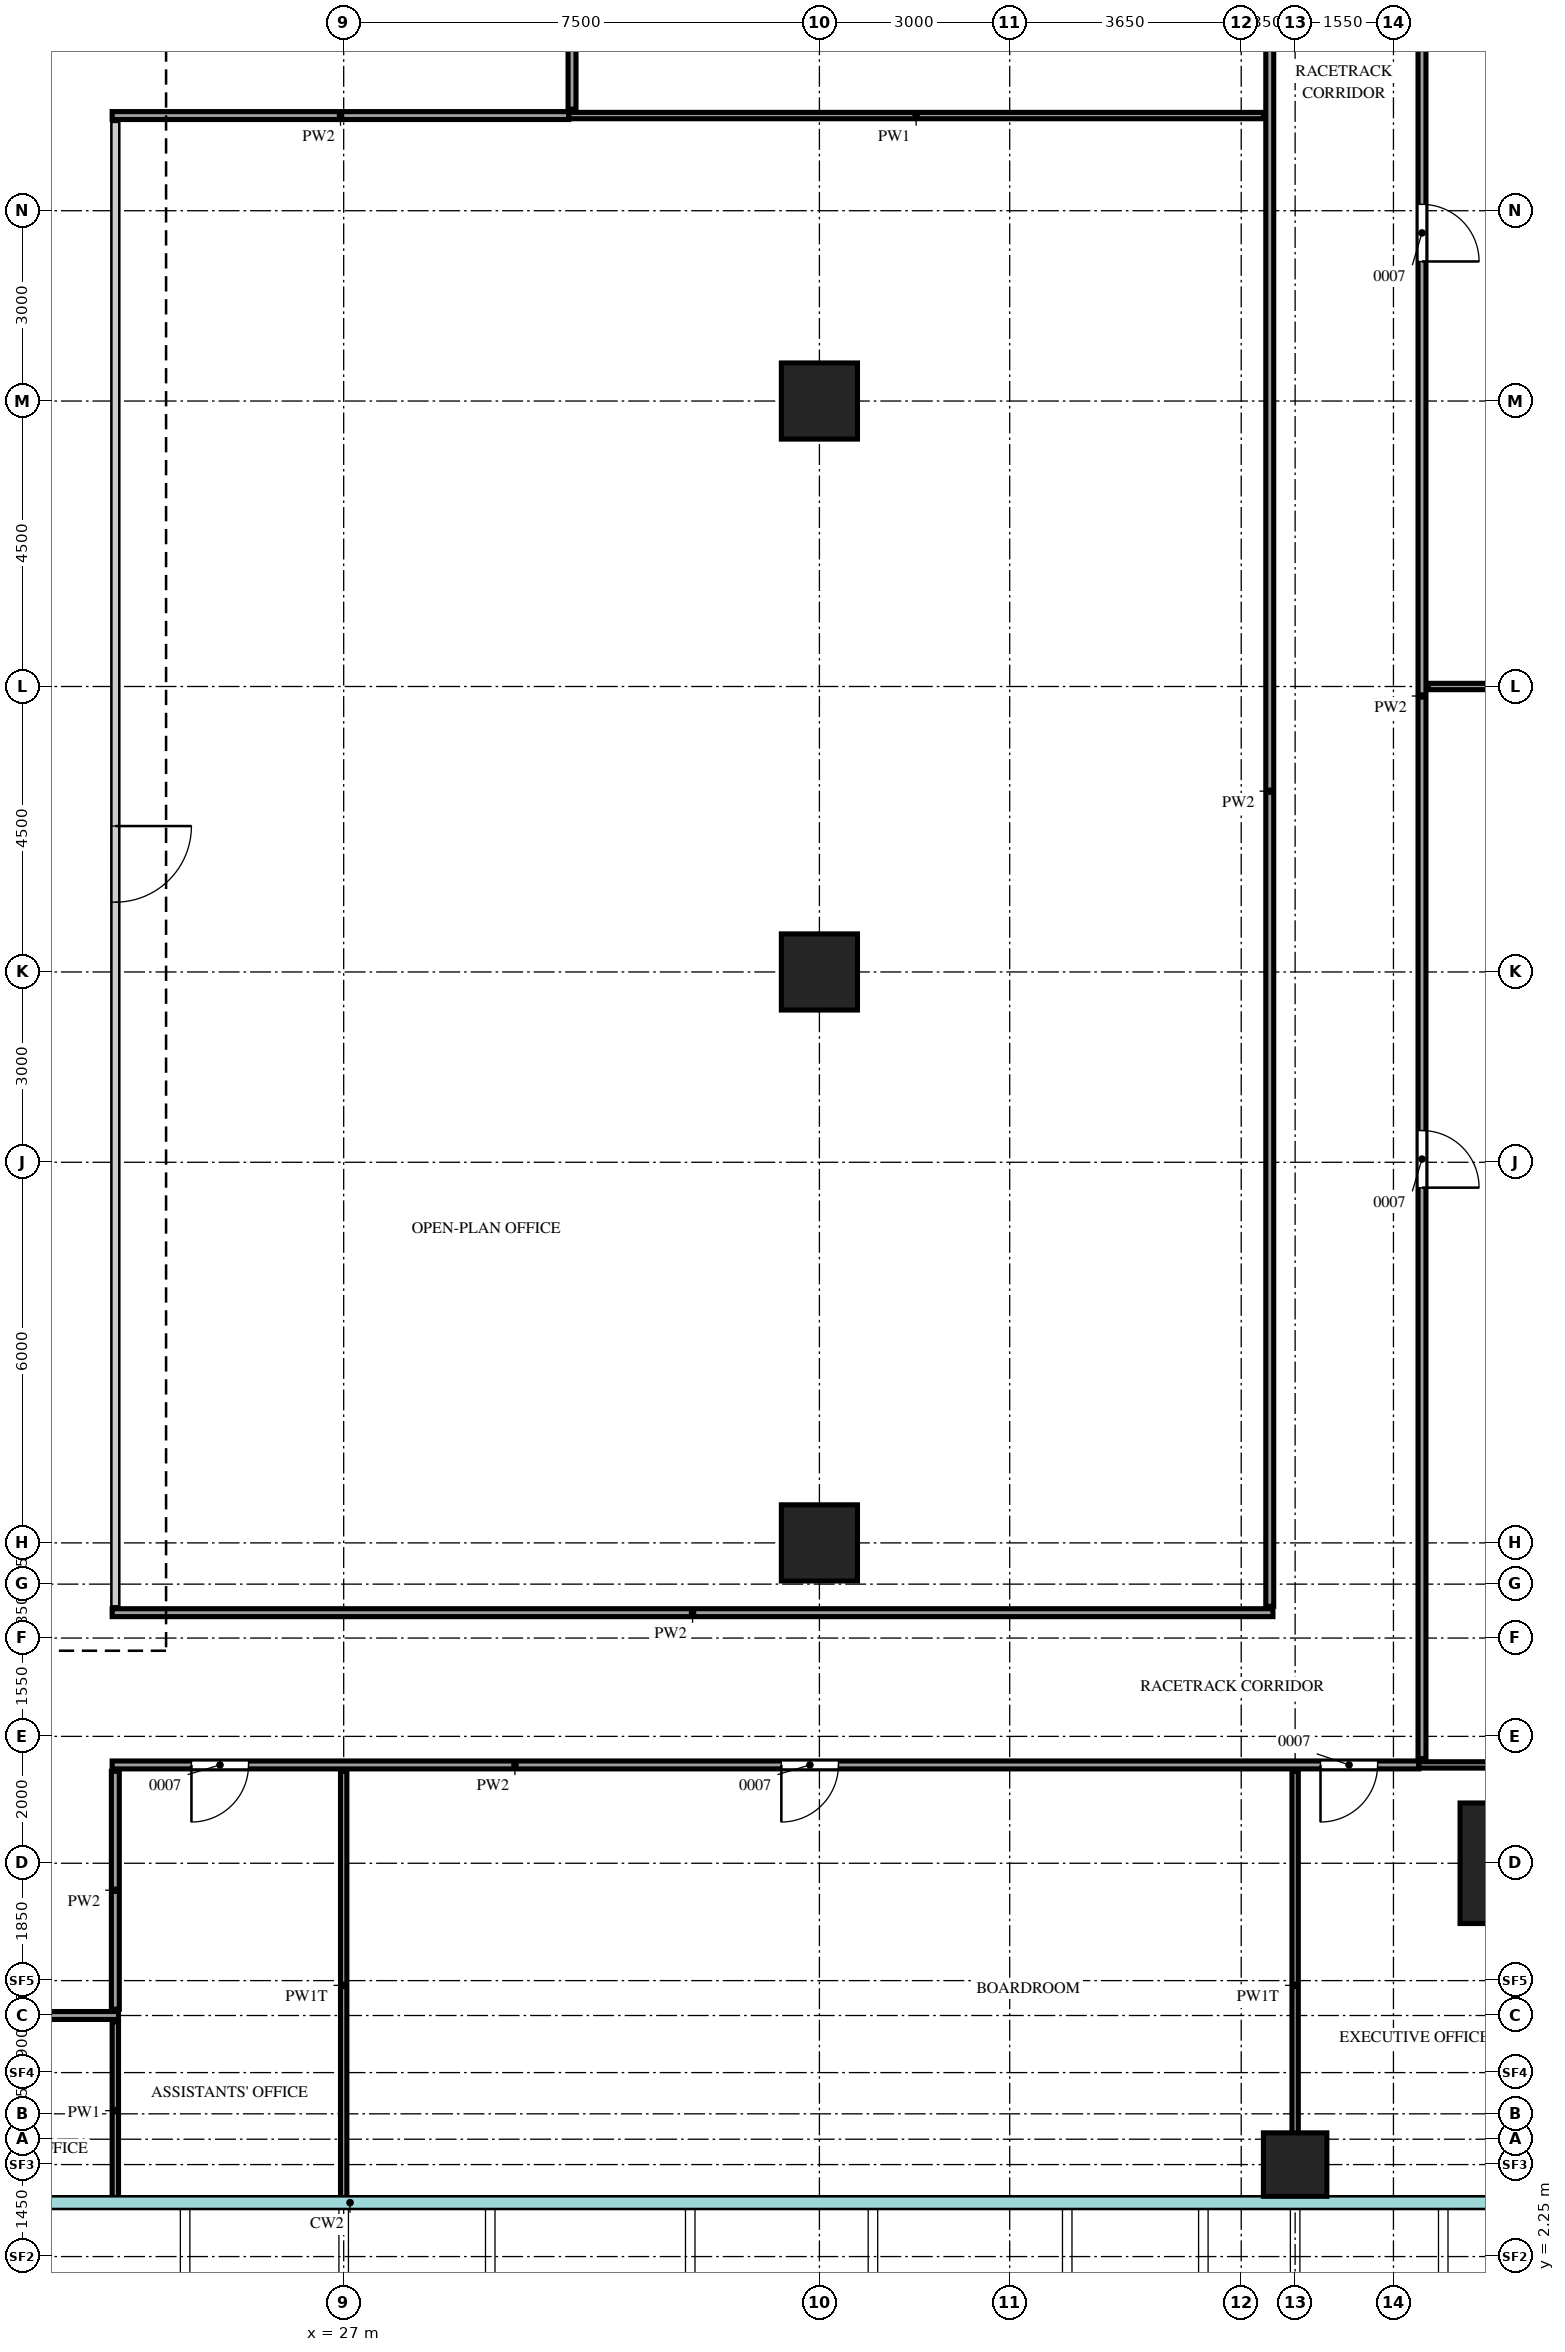
"""IFC4 building model, lengths in metres.
Left out: names, types, materials, properties, quantities, classifications, styles, units other than length and angle.
Written with IfcOpenShell. Run it as: python <this file> out.ifc"""

import sys

from ifc_helpers import new_model, si_unit, direction, frame, frame_2d, origin, origin_2d, place, context, subcontext, project, spatial, rectangle, extrude, source, transform, mapped, element, fill, save


model = new_model("IFC4")
c1 = context("Model", 3, precision=1e-05, world=origin(), true_north=direction((0.0, 1.0)))
c2 = subcontext(c1, "Body", "Model", "MODEL_VIEW")
j1 = project(units=[si_unit("LENGTHUNIT", "METRE"), si_unit("PLANEANGLEUNIT", "RADIAN")], contexts=[c1])
p1 = place(None, origin())
s1 = spatial("IfcSite", under=j1, at=p1, CompositionType="ELEMENT")
p2 = place(p1, origin())
s2 = spatial("IfcBuilding", under=s1, at=p2, CompositionType="ELEMENT")
p3 = place(p2, frame((0.0, 0.0, 200.7)))
s3 = spatial("IfcBuildingStorey", under=s2, at=p3, CompositionType="ELEMENT", Elevation=200.7)
m1 = source(origin(), c2, "Body", "SweptSolid", [
    extrude(rectangle(XDim=1.9, YDim=1.9, at=origin_2d()), origin(), (0.0, 0.0, 1.0), 4.0),
])
p4 = place(p3, frame((45.55, 8.45, 0.0), z_axis=(0.0, 0.0, 1.0), x_axis=(1.0, 0.0, 0.0)))
e1 = element("IfcColumn", 1, at=p4, inside=s3, PredefinedType="COLUMN", context=c2, shape_type="MappedRepresentation", body=[
    mapped(m1, transform((0.0, 0.0, 0.0))),
])
m2 = source(origin(), c2, "Body", "SweptSolid", [
    extrude(rectangle(XDim=1.0, YDim=1.0, at=origin_2d()), origin(), (0.0, 0.0, 1.0), 3.75),
])
p5 = place(p3, frame((42.0, 3.7, 0.0), z_axis=(0.0, 0.0, 1.0), x_axis=(1.0, 0.0, 0.0)))
e2 = element("IfcColumn", 2, at=p5, inside=s3, PredefinedType="COLUMN", context=c2, shape_type="MappedRepresentation", body=[
    mapped(m2, transform((0.0, 0.0, 0.0))),
])
m3 = source(origin(), c2, "Body", "SweptSolid", [
    extrude(rectangle(XDim=1.2, YDim=1.2, at=origin_2d()), origin(), (0.0, 0.0, 1.0), 3.75),
])
for number, where, z_axis, x_axis in (
    (3, (34.5, 13.5, 0.0), (0.0, 0.0, 1.0), (1.0, 0.0, 0.0)),
    (4, (34.5, 22.5, 0.0), (0.0, 0.0, 1.0), (1.0, 0.0, 0.0)),
    (5, (34.5, 31.5, 0.0), (0.0, 0.0, 1.0), (1.0, 0.0, 0.0)),
):
    element("IfcColumn", number, at=place(p3, frame(where, z_axis=z_axis, x_axis=x_axis)), inside=s3, PredefinedType="COLUMN", context=c2, shape_type="MappedRepresentation", body=[
        mapped(m3, transform((0.0, 0.0, 0.0))),
    ])
m4 = source(origin(), c2, "Body", "SweptSolid", [
    extrude(rectangle(XDim=2.8, YDim=0.1, at=frame_2d((1.4, 0.0))), origin(), (0.0, 0.0, 1.0), 3.8),
])
p6 = place(p3, frame((23.4, 3.15, 0.0), z_axis=(0.0, 0.0, 1.0), x_axis=(0.0, 1.0, 0.0)))
e6 = element("IfcWall", 6, at=p6, inside=s3, PredefinedType="PARTITIONING", context=c2, shape_type="MappedRepresentation", body=[
    mapped(m4, transform((0.0, 0.0, 0.0))),
])
m5 = source(origin(), c2, "Body", "SweptSolid", [
    extrude(rectangle(XDim=6.75, YDim=0.1, at=frame_2d((3.375, 0.0))), origin(), (0.0, 0.0, 1.0), 3.3),
])
for number, where, z_axis, x_axis in (
    (7, (27.0, 3.15, 0.0), (0.0, 0.0, 1.0), (0.0, 1.0, 0.0)),
    (8, (42.0, 3.15, 0.0), (0.0, 0.0, 1.0), (0.0, 1.0, 0.0)),
):
    element("IfcWall", number, at=place(p3, frame(where, z_axis=z_axis, x_axis=x_axis)), inside=s3, PredefinedType="PARTITIONING", context=c2, shape_type="MappedRepresentation", body=[
        mapped(m5, transform((0.0, 0.0, 0.0))),
    ])
m6 = source(origin(), c2, "Body", "SweptSolid", [
    extrude(rectangle(XDim=15.8, YDim=0.125, at=frame_2d((7.9, 0.0))), origin(), (0.0, 0.0, 1.0), 3.8),
])
p7 = place(p3, frame((7.65, 6.05, 0.0), z_axis=(0.0, 0.0, 1.0), x_axis=(1.0, 0.0, 0.0)))
e9 = element("IfcWall", 9, at=p7, inside=s3, PredefinedType="PARTITIONING", context=c2, shape_type="MappedRepresentation", body=[
    mapped(m6, transform((0.0, 0.0, 0.0))),
])
m7 = source(origin(), c2, "Body", "SweptSolid", [
    extrude(rectangle(XDim=0.9, YDim=2.1, at=frame_2d((0.45, 1.05))), frame((0.0, 0.073, 0.0), z_axis=(0.0, -1.0, 0.0), x_axis=(1.0, 0.0, 0.0)), (0.0, 0.0, 1.0), 0.145),
])
p8 = place(p7, frame((5.25, 0.0, 0.0)))
e10 = element("IfcOpeningElement", 10, at=p8, cuts=e9, PredefinedType="OPENING", context=c2, shape_type="MappedRepresentation", body=[
    mapped(m7, transform((0.0, 0.0, 0.0))),
])
p9 = place(p7, frame((13.35, 0.0, 0.0)))
e11 = element("IfcOpeningElement", 11, at=p9, cuts=e9, PredefinedType="OPENING", context=c2, shape_type="MappedRepresentation", body=[
    mapped(m7, transform((0.0, 0.0, 0.0))),
])
m8 = source(origin(), c2, "Body", "SweptSolid", [
    extrude(rectangle(XDim=3.75, YDim=0.125, at=frame_2d((1.875, 0.0))), origin(), (0.0, 0.0, 1.0), 3.8),
])
p10 = place(p3, frame((23.4, 6.15, 0.0), z_axis=(0.0, 0.0, 1.0), x_axis=(0.0, 1.0, 0.0)))
e12 = element("IfcWall", 12, at=p10, inside=s3, PredefinedType="PARTITIONING", context=c2, shape_type="MappedRepresentation", body=[
    mapped(m8, transform((0.0, 0.0, 0.0))),
])
m9 = source(origin(), c2, "Body", "SweptSolid", [
    extrude(rectangle(XDim=20.6, YDim=0.125, at=frame_2d((10.3, 0.0))), origin(), (0.0, 0.0, 1.0), 3.8),
])
p11 = place(p3, frame((23.35, 10.0, 0.0), z_axis=(0.0, 0.0, 1.0), x_axis=(1.0, 0.0, 0.0)))
e13 = element("IfcWall", 13, at=p11, inside=s3, PredefinedType="PARTITIONING", context=c2, shape_type="MappedRepresentation", body=[
    mapped(m9, transform((0.0, 0.0, 0.0))),
])
p12 = place(p11, frame((1.25, 0.0, 0.0)))
e14 = element("IfcOpeningElement", 14, at=p12, cuts=e13, PredefinedType="OPENING", context=c2, shape_type="MappedRepresentation", body=[
    mapped(m7, transform((0.0, 0.0, 0.0))),
])
p13 = place(p11, frame((10.55, 0.0, 0.0)))
e15 = element("IfcOpeningElement", 15, at=p13, cuts=e13, PredefinedType="OPENING", context=c2, shape_type="MappedRepresentation", body=[
    mapped(m7, transform((0.0, 0.0, 0.0))),
])
p14 = place(p11, frame((19.05, 0.0, 0.0)))
e16 = element("IfcOpeningElement", 16, at=p14, cuts=e13, PredefinedType="OPENING", context=c2, shape_type="MappedRepresentation", body=[
    mapped(m7, transform((0.0, 0.0, 0.0))),
])
m10 = source(origin(), c2, "Body", "SweptSolid", [
    extrude(rectangle(XDim=6.9, YDim=0.1, at=frame_2d((3.45, 0.0))), origin(), (0.0, 0.0, 1.0), 3.8),
])
p15 = place(p3, frame((43.95, 10.0, 0.0), z_axis=(0.0, 0.0, 1.0), x_axis=(1.0, 0.0, 0.0)))
e17 = element("IfcWall", 17, at=p15, inside=s3, PredefinedType="PARTITIONING", context=c2, shape_type="MappedRepresentation", body=[
    mapped(m10, transform((0.0, 0.0, 0.0))),
])
m11 = source(origin(), c2, "Body", "SweptSolid", [
    extrude(rectangle(XDim=33.8, YDim=0.125, at=frame_2d((16.9, 0.0))), origin(), (0.0, 0.0, 1.0), 3.8),
])
p16 = place(p3, frame((44.0, 10.1, 0.0), z_axis=(0.0, 0.0, 1.0), x_axis=(0.0, 1.0, 0.0)))
e18 = element("IfcWall", 18, at=p16, inside=s3, PredefinedType="PARTITIONING", context=c2, shape_type="MappedRepresentation", body=[
    mapped(m11, transform((0.0, 0.0, 0.0))),
])
p17 = place(p16, frame((9.0, 0.0, 0.0)))
e19 = element("IfcOpeningElement", 19, at=p17, cuts=e18, PredefinedType="OPENING", context=c2, shape_type="MappedRepresentation", body=[
    mapped(m7, transform((0.0, 0.0, 0.0))),
])
p18 = place(p16, frame((23.6, 0.0, 0.0)))
e20 = element("IfcOpeningElement", 20, at=p18, cuts=e18, PredefinedType="OPENING", context=c2, shape_type="MappedRepresentation", body=[
    mapped(m7, transform((0.0, 0.0, 0.0))),
])
m12 = source(origin(), c2, "Body", "SweptSolid", [
    extrude(rectangle(XDim=18.3, YDim=0.125, at=frame_2d((9.15, 0.0))), origin(), (0.0, 0.0, 1.0), 3.8),
])
p19 = place(p3, frame((23.35, 12.4, 0.0), z_axis=(0.0, 0.0, 1.0), x_axis=(1.0, 0.0, 0.0)))
e21 = element("IfcWall", 21, at=p19, inside=s3, PredefinedType="PARTITIONING", context=c2, shape_type="MappedRepresentation", body=[
    mapped(m12, transform((0.0, 0.0, 0.0))),
])
m13 = source(origin(), c2, "Body", "SweptSolid", [
    extrude(rectangle(XDim=23.4, YDim=0.125, at=frame_2d((11.7, 0.0))), origin(), (0.0, 0.0, 1.0), 3.8),
])
p20 = place(p3, frame((23.4, 12.5, 0.0), z_axis=(0.0, 0.0, 1.0), x_axis=(0.0, 1.0, 0.0)))
e22 = element("IfcWall", 22, at=p20, inside=s3, PredefinedType="PARTITIONING", context=c2, shape_type="MappedRepresentation", body=[
    mapped(m13, transform((0.0, 0.0, 0.0))),
])
m14 = source(origin(), c2, "Body", "SweptSolid", [
    extrude(rectangle(XDim=1.2, YDim=2.1, at=frame_2d((0.6, 1.05))), frame((0.0, 0.073, 0.0), z_axis=(0.0, -1.0, 0.0), x_axis=(1.0, 0.0, 0.0)), (0.0, 0.0, 1.0), 0.145),
])
p21 = place(p20, frame((11.1, 0.0, 0.0)))
e23 = element("IfcOpeningElement", 23, at=p21, cuts=e22, PredefinedType="OPENING", context=c2, shape_type="MappedRepresentation", body=[
    mapped(m14, transform((0.0, 0.0, 0.0))),
])
m15 = source(origin(), c2, "Body", "SweptSolid", [
    extrude(rectangle(XDim=29.0, YDim=0.125, at=frame_2d((14.5, 0.0))), origin(), (0.0, 0.0, 1.0), 3.8),
])
p22 = place(p3, frame((41.6, 12.5, 0.0), z_axis=(0.0, 0.0, 1.0), x_axis=(0.0, 1.0, 0.0)))
e24 = element("IfcWall", 24, at=p22, inside=s3, PredefinedType="PARTITIONING", context=c2, shape_type="MappedRepresentation", body=[
    mapped(m15, transform((0.0, 0.0, 0.0))),
])
p23 = place(p22, frame((25.7, 0.0, 0.0)))
e25 = element("IfcOpeningElement", 25, at=p23, cuts=e24, PredefinedType="OPENING", context=c2, shape_type="MappedRepresentation", body=[
    mapped(m7, transform((0.0, 0.0, 0.0))),
])
m16 = source(origin(), c2, "Body", "SweptSolid", [
    extrude(rectangle(XDim=6.75, YDim=0.1, at=frame_2d((3.375, 0.0))), origin(), (0.0, 0.0, 1.0), 3.8),
])
p24 = place(p3, frame((44.1, 27.0, 0.0), z_axis=(0.0, 0.0, 1.0), x_axis=(1.0, 0.0, 0.0)))
e26 = element("IfcWall", 26, at=p24, inside=s3, PredefinedType="PARTITIONING", context=c2, shape_type="MappedRepresentation", body=[
    mapped(m16, transform((0.0, 0.0, 0.0))),
])
m17 = source(origin(), c2, "Body", "SweptSolid", [
    extrude(rectangle(XDim=7.2, YDim=0.125, at=frame_2d((3.6, 0.0))), origin(), (0.0, 0.0, 1.0), 3.8),
])
p25 = place(p3, frame((23.35, 36.0, 0.0), z_axis=(0.0, 0.0, 1.0), x_axis=(1.0, 0.0, 0.0)))
e27 = element("IfcWall", 27, at=p25, inside=s3, PredefinedType="PARTITIONING", context=c2, shape_type="MappedRepresentation", body=[
    mapped(m17, transform((0.0, 0.0, 0.0))),
])
m18 = source(origin(), c2, "Body", "SweptSolid", [
    extrude(rectangle(XDim=10.95, YDim=0.1, at=frame_2d((5.475, 0.0))), origin(), (0.0, 0.0, 1.0), 3.8),
])
p26 = place(p3, frame((30.55, 36.0, 0.0), z_axis=(0.0, 0.0, 1.0), x_axis=(1.0, 0.0, 0.0)))
e28 = element("IfcWall", 28, at=p26, inside=s3, PredefinedType="PARTITIONING", context=c2, shape_type="MappedRepresentation", body=[
    mapped(m18, transform((0.0, 0.0, 0.0))),
])
m19 = source(origin(), c2, "Body", "SweptSolid", [
    extrude(rectangle(XDim=5.4, YDim=0.125, at=frame_2d((2.7, 0.0))), origin(), (0.0, 0.0, 1.0), 3.8),
])
p27 = place(p3, frame((30.6, 36.1, 0.0), z_axis=(0.0, 0.0, 1.0), x_axis=(0.0, 1.0, 0.0)))
e29 = element("IfcWall", 29, at=p27, inside=s3, PredefinedType="PARTITIONING", context=c2, shape_type="MappedRepresentation", body=[
    mapped(m19, transform((0.0, 0.0, 0.0))),
])
m20 = source(origin(), c2, "Body", "SweptSolid", [
    extrude(rectangle(XDim=0.9, YDim=2.1, at=frame_2d((0.45, 1.05))), frame((0.0, 0.025, 0.0), z_axis=(0.0, -1.0, 0.0), x_axis=(1.0, 0.0, 0.0)), (0.0, 0.0, 1.0), 0.05),
])
p28 = place(p12, origin())
e30 = element("IfcDoor", 30, at=p28, inside=s3, OperationType="SINGLE_SWING_LEFT", PredefinedType="DOOR", context=c2, shape_type="MappedRepresentation", body=[
    mapped(m20, transform((0.0, 0.0, 0.0))),
])
fill(e14, e30)
p29 = place(p13, origin())
e31 = element("IfcDoor", 31, at=p29, inside=s3, OperationType="SINGLE_SWING_LEFT", PredefinedType="DOOR", context=c2, shape_type="MappedRepresentation", body=[
    mapped(m20, transform((0.0, 0.0, 0.0))),
])
fill(e15, e31)
p30 = place(p14, origin())
e32 = element("IfcDoor", 32, at=p30, inside=s3, OperationType="SINGLE_SWING_LEFT", PredefinedType="DOOR", context=c2, shape_type="MappedRepresentation", body=[
    mapped(m20, transform((0.0, 0.0, 0.0))),
])
fill(e16, e32)
p31 = place(p17, origin())
e33 = element("IfcDoor", 33, at=p31, inside=s3, OperationType="SINGLE_SWING_LEFT", PredefinedType="DOOR", context=c2, shape_type="MappedRepresentation", body=[
    mapped(m20, transform((0.0, 0.0, 0.0))),
])
fill(e19, e33)
p32 = place(p18, origin())
e34 = element("IfcDoor", 34, at=p32, inside=s3, OperationType="SINGLE_SWING_LEFT", PredefinedType="DOOR", context=c2, shape_type="MappedRepresentation", body=[
    mapped(m20, transform((0.0, 0.0, 0.0))),
])
fill(e20, e34)
m21 = source(origin(), c2, "Body", "SweptSolid", [
    extrude(rectangle(XDim=1.2, YDim=2.1, at=frame_2d((0.6, 1.05))), frame((0.0, 0.025, 0.0), z_axis=(0.0, -1.0, 0.0), x_axis=(1.0, 0.0, 0.0)), (0.0, 0.0, 1.0), 0.05),
])
p33 = place(p21, origin())
e35 = element("IfcDoor", 35, at=p33, inside=s3, OperationType="SINGLE_SWING_RIGHT", PredefinedType="DOOR", context=c2, shape_type="MappedRepresentation", body=[
    mapped(m21, transform((0.0, 0.0, 0.0))),
])
fill(e23, e35)
save(model, sys.argv[1])
